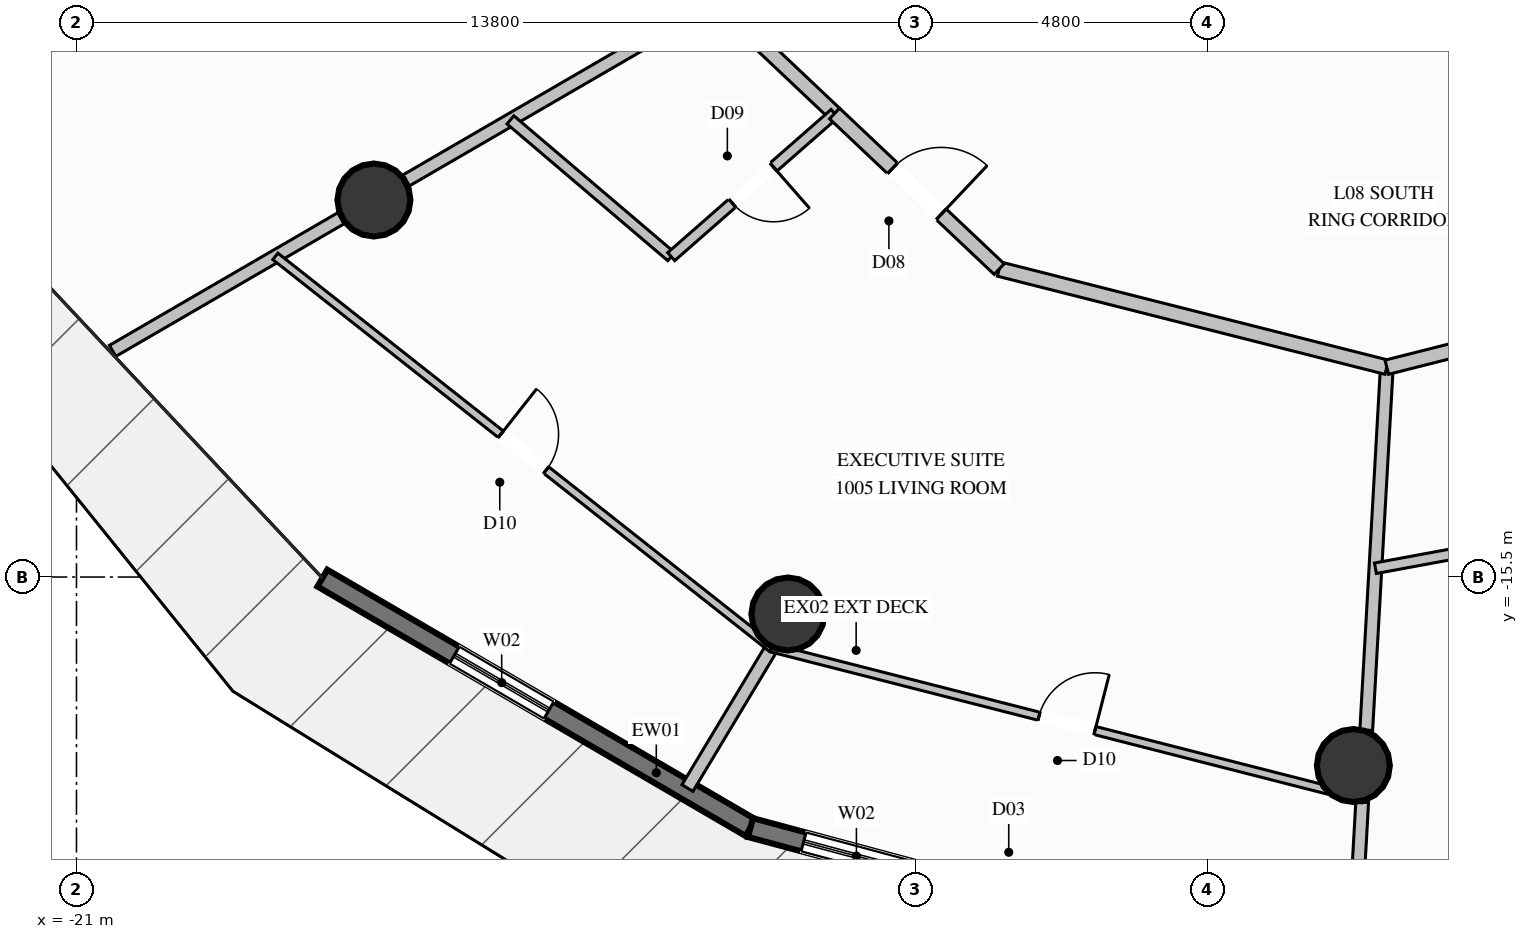
"""IFC4 building model, lengths in metres.
Left out: names, types, materials, properties, quantities, classifications, styles, units other than length and angle.
Written with IfcOpenShell. Run it as: python <this file> out.ifc"""

import sys

from ifc_helpers import new_model, si_unit, direction, frame, frame_2d, origin, origin_2d, place, context, subcontext, project, spatial, rectangle, circle, extrude, element, fill, save


model = new_model("IFC4")
c1 = context("Model", 3, precision=1e-05, world=origin(), true_north=direction((0.0, 1.0)))
c2 = subcontext(c1, "Body", "Model", "MODEL_VIEW")
j1 = project(units=[si_unit("LENGTHUNIT", "METRE"), si_unit("PLANEANGLEUNIT", "RADIAN")], contexts=[c1])
p1 = place(None, origin())
s1 = spatial("IfcSite", under=j1, at=p1, CompositionType="ELEMENT")
p2 = place(p1, origin())
s2 = spatial("IfcBuilding", under=s1, at=p2, CompositionType="ELEMENT")
p3 = place(p2, frame((0.0, 0.0, 39.2)))
s3 = spatial("IfcBuildingStorey", under=s2, at=p3, CompositionType="ELEMENT", Elevation=39.2)
for number, where, z_axis, x_axis in (
    (1, (-16.108, -9.3, 0.0), (0.0, 0.0, 1.0), (1.0, 0.0, 0.0)),
    (2, (-9.3, -16.108, 0.0), (0.0, 0.0, 1.0), (1.0, 0.0, 0.0)),
    (3, (0.0, -18.6, 0.0), (0.0, 0.0, 1.0), (1.0, 0.0, 0.0)),
):
    element("IfcColumn", number, at=place(p3, frame(where, z_axis=z_axis, x_axis=x_axis)), inside=s3, PredefinedType="COLUMN", context=c2, shape_type="SweptSolid", body=[
        extrude(circle(Radius=0.6, at=origin_2d()), origin(), (0.0, 0.0, 1.0), 3.6),
    ])
p4 = place(p3, frame((-9.915, -19.621, 0.0), z_axis=(0.0, 0.0, 1.0), x_axis=(-0.864004822612, 0.503483531512, 0.0)))
e4 = element("IfcWall", 4, at=p4, inside=s3, PredefinedType="SOLIDWALL", context=c2, shape_type="SweptSolid", body=[
    extrude(rectangle(XDim=8.149, YDim=0.32, at=frame_2d((4.075, 0.0))), origin(), (0.0, 0.0, 1.0), 3.34),
])
p5 = place(p4, frame((3.836, 0.0, 0.35)))
e5 = element("IfcOpeningElement", 5, at=p5, cuts=e4, PredefinedType="OPENING", context=c2, shape_type="SweptSolid", body=[
    extrude(rectangle(XDim=1.8, YDim=2.6, at=frame_2d((0.9, 1.3))), frame((0.0, 0.17, 0.0), z_axis=(0.0, -1.0, 0.0), x_axis=(1.0, 0.0, 0.0)), (0.0, 0.0, 1.0), 0.34),
])
p6 = place(p3, frame((-1.79, -21.803, 0.0), z_axis=(0.0, 0.0, 1.0), x_axis=(-0.965783113011, 0.259351072145, 0.0)))
e6 = element("IfcWall", 6, at=p6, inside=s3, PredefinedType="SOLIDWALL", context=c2, shape_type="SweptSolid", body=[
    extrude(rectangle(XDim=8.413, YDim=0.32, at=frame_2d((4.207, 0.0))), origin(), (0.0, 0.0, 1.0), 3.34),
])
p7 = place(p6, frame((5.709, 0.0, 0.35)))
e7 = element("IfcOpeningElement", 7, at=p7, cuts=e6, PredefinedType="OPENING", context=c2, shape_type="SweptSolid", body=[
    extrude(rectangle(XDim=1.8, YDim=2.6, at=frame_2d((0.9, 1.3))), frame((0.0, 0.17, 0.0), z_axis=(0.0, -1.0, 0.0), x_axis=(1.0, 0.0, 0.0)), (0.0, 0.0, 1.0), 0.34),
])
p8 = place(p6, frame((3.656, 0.0, 0.0)))
e8 = element("IfcOpeningElement", 8, at=p8, cuts=e6, PredefinedType="OPENING", context=c2, shape_type="SweptSolid", body=[
    extrude(rectangle(XDim=1.1, YDim=2.2, at=frame_2d((0.55, 1.1))), frame((0.0, 0.17, 0.0), z_axis=(0.0, -1.0, 0.0), x_axis=(1.0, 0.0, 0.0)), (0.0, 0.0, 1.0), 0.34),
])
p9 = place(p3, frame((-10.492, -6.025, 0.0), z_axis=(0.0, 0.0, 1.0), x_axis=(-0.86478894661, -0.502135517387, 0.0)))
e9 = element("IfcWall", 9, at=p9, inside=s3, PredefinedType="PARTITIONING", context=c2, shape_type="SweptSolid", body=[
    extrude(rectangle(XDim=5.881, YDim=0.21, at=frame_2d((2.94, 0.0))), origin(), (0.0, 0.0, 1.0), 2.709),
])
p10 = place(p3, frame((-16.65, -9.6, 0.0), z_axis=(0.0, 0.0, 1.0), x_axis=(-0.864794458223, -0.502126025044, 0.0)))
e10 = element("IfcWall", 10, at=p10, inside=s3, PredefinedType="PARTITIONING", context=c2, shape_type="SweptSolid", body=[
    extrude(rectangle(XDim=4.343, YDim=0.21, at=frame_2d((2.172, 0.0))), origin(), (0.0, 0.0, 1.0), 3.34),
])
p11 = place(p3, frame((0.55, -12.05, 0.0), z_axis=(0.0, 0.0, 1.0), x_axis=(-0.056567082794, -0.998398800652, 0.0)))
e11 = element("IfcWall", 11, at=p11, inside=s3, PredefinedType="PARTITIONING", context=c2, shape_type="SweptSolid", body=[
    extrude(rectangle(XDim=5.978, YDim=0.21, at=frame_2d((2.989, 0.0))), origin(), (0.0, 0.0, 1.0), 3.34),
])
p12 = place(p3, frame((0.145, -19.203, 0.0), z_axis=(0.0, 0.0, 1.0), x_axis=(-0.056336717454, -0.998411825985, 0.0)))
e12 = element("IfcWall", 12, at=p12, inside=s3, PredefinedType="PARTITIONING", context=c2, shape_type="SweptSolid", body=[
    extrude(rectangle(XDim=2.574, YDim=0.21, at=frame_2d((1.287, 0.0))), origin(), (0.0, 0.0, 1.0), 3.34),
])
p13 = place(p3, frame((-10.492, -6.025, 0.0), z_axis=(0.0, 0.0, 1.0), x_axis=(0.726651583854, -0.687006168591, 0.0)))
e13 = element("IfcWall", 13, at=p13, inside=s3, PredefinedType="PARTITIONING", context=c2, shape_type="SweptSolid", body=[
    extrude(rectangle(XDim=2.697, YDim=0.24, at=frame_2d((1.349, 0.0))), origin(), (0.0, 0.0, 1.0), 3.34),
])
p14 = place(p3, frame((-13.863, -7.982, 0.0), z_axis=(0.0, 0.0, 1.0), x_axis=(0.761713672962, -0.647913790888, 0.0)))
e14 = element("IfcWall", 14, at=p14, inside=s3, PredefinedType="PLUMBINGWALL", context=c2, shape_type="SweptSolid", body=[
    extrude(rectangle(XDim=3.471, YDim=0.175, at=frame_2d((1.736, 0.0))), origin(), (0.0, 0.0, 1.0), 3.34),
])
p15 = place(p3, frame((-8.532, -7.878, 0.0), z_axis=(0.0, 0.0, 1.0), x_axis=(-0.752314103663, -0.658804591233, 0.0)))
e15 = element("IfcWall", 15, at=p15, inside=s3, PredefinedType="PLUMBINGWALL", context=c2, shape_type="SweptSolid", body=[
    extrude(rectangle(XDim=3.572, YDim=0.175, at=frame_2d((1.786, 0.0))), origin(), (0.0, 0.0, 1.0), 3.34),
])
p16 = place(p15, frame((1.336, 0.0, 0.0)))
e16 = element("IfcOpeningElement", 16, at=p16, cuts=e15, PredefinedType="OPENING", context=c2, shape_type="SweptSolid", body=[
    extrude(rectangle(XDim=0.9, YDim=2.1, at=frame_2d((0.45, 1.05))), frame((0.0, 0.098, 0.0), z_axis=(0.0, -1.0, 0.0), x_axis=(1.0, 0.0, 0.0)), (0.0, 0.0, 1.0), 0.195),
])
p17 = place(p3, frame((-9.568, -16.666, 0.0), z_axis=(0.0, 0.0, 1.0), x_axis=(-0.514883110299, -0.857260393771, 0.0)))
e17 = element("IfcWall", 17, at=p17, inside=s3, PredefinedType="PARTITIONING", context=c2, shape_type="SweptSolid", body=[
    extrude(rectangle(XDim=2.688, YDim=0.21, at=frame_2d((1.344, 0.0))), origin(), (0.0, 0.0, 1.0), 3.34),
])
p18 = place(p3, frame((-5.825, -10.436, 0.0), z_axis=(0.0, 0.0, 1.0), x_axis=(0.969413132073, -0.245434674331, 0.0)))
e18 = element("IfcWall", 18, at=p18, inside=s3, PredefinedType="PARTITIONING", context=c2, shape_type="SweptSolid", body=[
    extrude(rectangle(XDim=6.576, YDim=0.24, at=frame_2d((3.288, 0.0))), origin(), (0.0, 0.0, 1.0), 3.34),
])
p19 = place(p3, frame((-8.532, -7.878, 0.0), z_axis=(0.0, 0.0, 1.0), x_axis=(0.726816794063, -0.686831382413, 0.0)))
e19 = element("IfcWall", 19, at=p19, inside=s3, PredefinedType="PARTITIONING", context=c2, shape_type="SweptSolid", body=[
    extrude(rectangle(XDim=3.725, YDim=0.24, at=frame_2d((1.862, 0.0))), origin(), (0.0, 0.0, 1.0), 3.34),
])
p20 = place(p19, frame((1.312, 0.0, 0.0)))
e20 = element("IfcOpeningElement", 20, at=p20, cuts=e19, PredefinedType="OPENING", context=c2, shape_type="SweptSolid", body=[
    extrude(rectangle(XDim=1.1, YDim=2.3, at=frame_2d((0.55, 1.15))), frame((0.0, 0.13, 0.0), z_axis=(0.0, -1.0, 0.0), x_axis=(1.0, 0.0, 0.0)), (0.0, 0.0, 1.0), 0.26),
])
p21 = place(p3, frame((-17.729, -10.227, 0.0), z_axis=(0.0, 0.0, 1.0), x_axis=(0.785062483649, -0.61941657773, 0.0)))
e21 = element("IfcWall", 21, at=p21, inside=s3, PredefinedType="PARTITIONING", context=c2, shape_type="SweptSolid", body=[
    extrude(rectangle(XDim=10.395, YDim=0.135, at=frame_2d((5.198, 0.0))), origin(), (0.0, 0.0, 1.0), 2.792),
])
p22 = place(p21, frame((4.723, 0.0, 0.0)))
e22 = element("IfcOpeningElement", 22, at=p22, cuts=e21, PredefinedType="OPENING", context=c2, shape_type="SweptSolid", body=[
    extrude(rectangle(XDim=0.95, YDim=2.1, at=frame_2d((0.475, 1.05))), frame((0.0, 0.078, 0.0), z_axis=(0.0, -1.0, 0.0), x_axis=(1.0, 0.0, 0.0)), (0.0, 0.0, 1.0), 0.155),
])
p23 = place(p3, frame((-9.568, -16.666, 0.0), z_axis=(0.0, 0.0, 1.0), x_axis=(0.968894117995, -0.247475631354, 0.0)))
e23 = element("IfcWall", 23, at=p23, inside=s3, PredefinedType="PARTITIONING", context=c2, shape_type="SweptSolid", body=[
    extrude(rectangle(XDim=10.029, YDim=0.135, at=frame_2d((5.015, 0.0))), origin(), (0.0, 0.0, 1.0), 2.792),
])
p24 = place(p23, frame((4.539, 0.0, 0.0)))
e24 = element("IfcOpeningElement", 24, at=p24, cuts=e23, PredefinedType="OPENING", context=c2, shape_type="SweptSolid", body=[
    extrude(rectangle(XDim=0.95, YDim=2.1, at=frame_2d((0.475, 1.05))), frame((0.0, 0.078, 0.0), z_axis=(0.0, -1.0, 0.0), x_axis=(1.0, 0.0, 0.0)), (0.0, 0.0, 1.0), 0.155),
])
p25 = place(p3, frame((0.55, -12.05, 0.0), z_axis=(0.0, 0.0, 1.0), x_axis=(0.969415576054, 0.245425020941, 0.0)))
e25 = element("IfcWall", 25, at=p25, inside=s3, PredefinedType="PARTITIONING", context=c2, shape_type="SweptSolid", body=[
    extrude(rectangle(XDim=2.762, YDim=0.24, at=frame_2d((1.381, 0.0))), origin(), (0.0, 0.0, 1.0), 3.34),
])
p26 = place(p3, frame((0.363, -15.356, 0.0), z_axis=(0.0, 0.0, 1.0), x_axis=(0.983357535979, 0.18168091929, 0.0)))
e26 = element("IfcWall", 26, at=p26, inside=s3, PredefinedType="PLUMBINGWALL", context=c2, shape_type="SweptSolid", body=[
    extrude(rectangle(XDim=3.511, YDim=0.175, at=frame_2d((1.756, 0.0))), origin(), (0.0, 0.0, 1.0), 3.34),
])
p27 = place(p5, origin())
e27 = element("IfcWindow", 27, at=p27, inside=s3, PartitioningType="SINGLE_PANEL", PredefinedType="WINDOW", context=c2, shape_type="SweptSolid", body=[
    extrude(rectangle(XDim=1.8, YDim=2.6, at=frame_2d((0.9, 1.3))), frame((0.0, 0.03, 0.0), z_axis=(0.0, -1.0, 0.0), x_axis=(1.0, 0.0, 0.0)), (0.0, 0.0, 1.0), 0.06),
])
fill(e5, e27)
p28 = place(p7, origin())
e28 = element("IfcWindow", 28, at=p28, inside=s3, PartitioningType="SINGLE_PANEL", PredefinedType="WINDOW", context=c2, shape_type="SweptSolid", body=[
    extrude(rectangle(XDim=1.8, YDim=2.6, at=frame_2d((0.9, 1.3))), frame((0.0, 0.03, 0.0), z_axis=(0.0, -1.0, 0.0), x_axis=(1.0, 0.0, 0.0)), (0.0, 0.0, 1.0), 0.06),
])
fill(e7, e28)
p29 = place(p16, origin())
e29 = element("IfcDoor", 29, at=p29, inside=s3, OperationType="SINGLE_SWING_LEFT", PredefinedType="DOOR", context=c2, shape_type="SweptSolid", body=[
    extrude(rectangle(XDim=0.9, YDim=2.1, at=frame_2d((0.45, 1.05))), frame((0.0, 0.025, 0.0), z_axis=(0.0, -1.0, 0.0), x_axis=(1.0, 0.0, 0.0)), (0.0, 0.0, 1.0), 0.05),
])
fill(e16, e29)
p30 = place(p20, origin())
e30 = element("IfcDoor", 30, at=p30, inside=s3, OperationType="SINGLE_SWING_RIGHT", PredefinedType="DOOR", context=c2, shape_type="SweptSolid", body=[
    extrude(rectangle(XDim=1.1, YDim=2.3, at=frame_2d((0.55, 1.15))), frame((0.0, 0.025, 0.0), z_axis=(0.0, -1.0, 0.0), x_axis=(1.0, 0.0, 0.0)), (0.0, 0.0, 1.0), 0.05),
])
fill(e20, e30)
p31 = place(p22, origin())
e31 = element("IfcDoor", 31, at=p31, inside=s3, OperationType="SINGLE_SWING_LEFT", PredefinedType="DOOR", context=c2, shape_type="SweptSolid", body=[
    extrude(rectangle(XDim=0.95, YDim=2.1, at=frame_2d((0.475, 1.05))), frame((0.0, 0.025, 0.0), z_axis=(0.0, -1.0, 0.0), x_axis=(1.0, 0.0, 0.0)), (0.0, 0.0, 1.0), 0.05),
])
fill(e22, e31)
p32 = place(p24, origin())
e32 = element("IfcDoor", 32, at=p32, inside=s3, OperationType="SINGLE_SWING_RIGHT", PredefinedType="DOOR", context=c2, shape_type="SweptSolid", body=[
    extrude(rectangle(XDim=0.95, YDim=2.1, at=frame_2d((0.475, 1.05))), frame((0.0, 0.025, 0.0), z_axis=(0.0, -1.0, 0.0), x_axis=(1.0, 0.0, 0.0)), (0.0, 0.0, 1.0), 0.05),
])
fill(e24, e32)
save(model, sys.argv[1])
